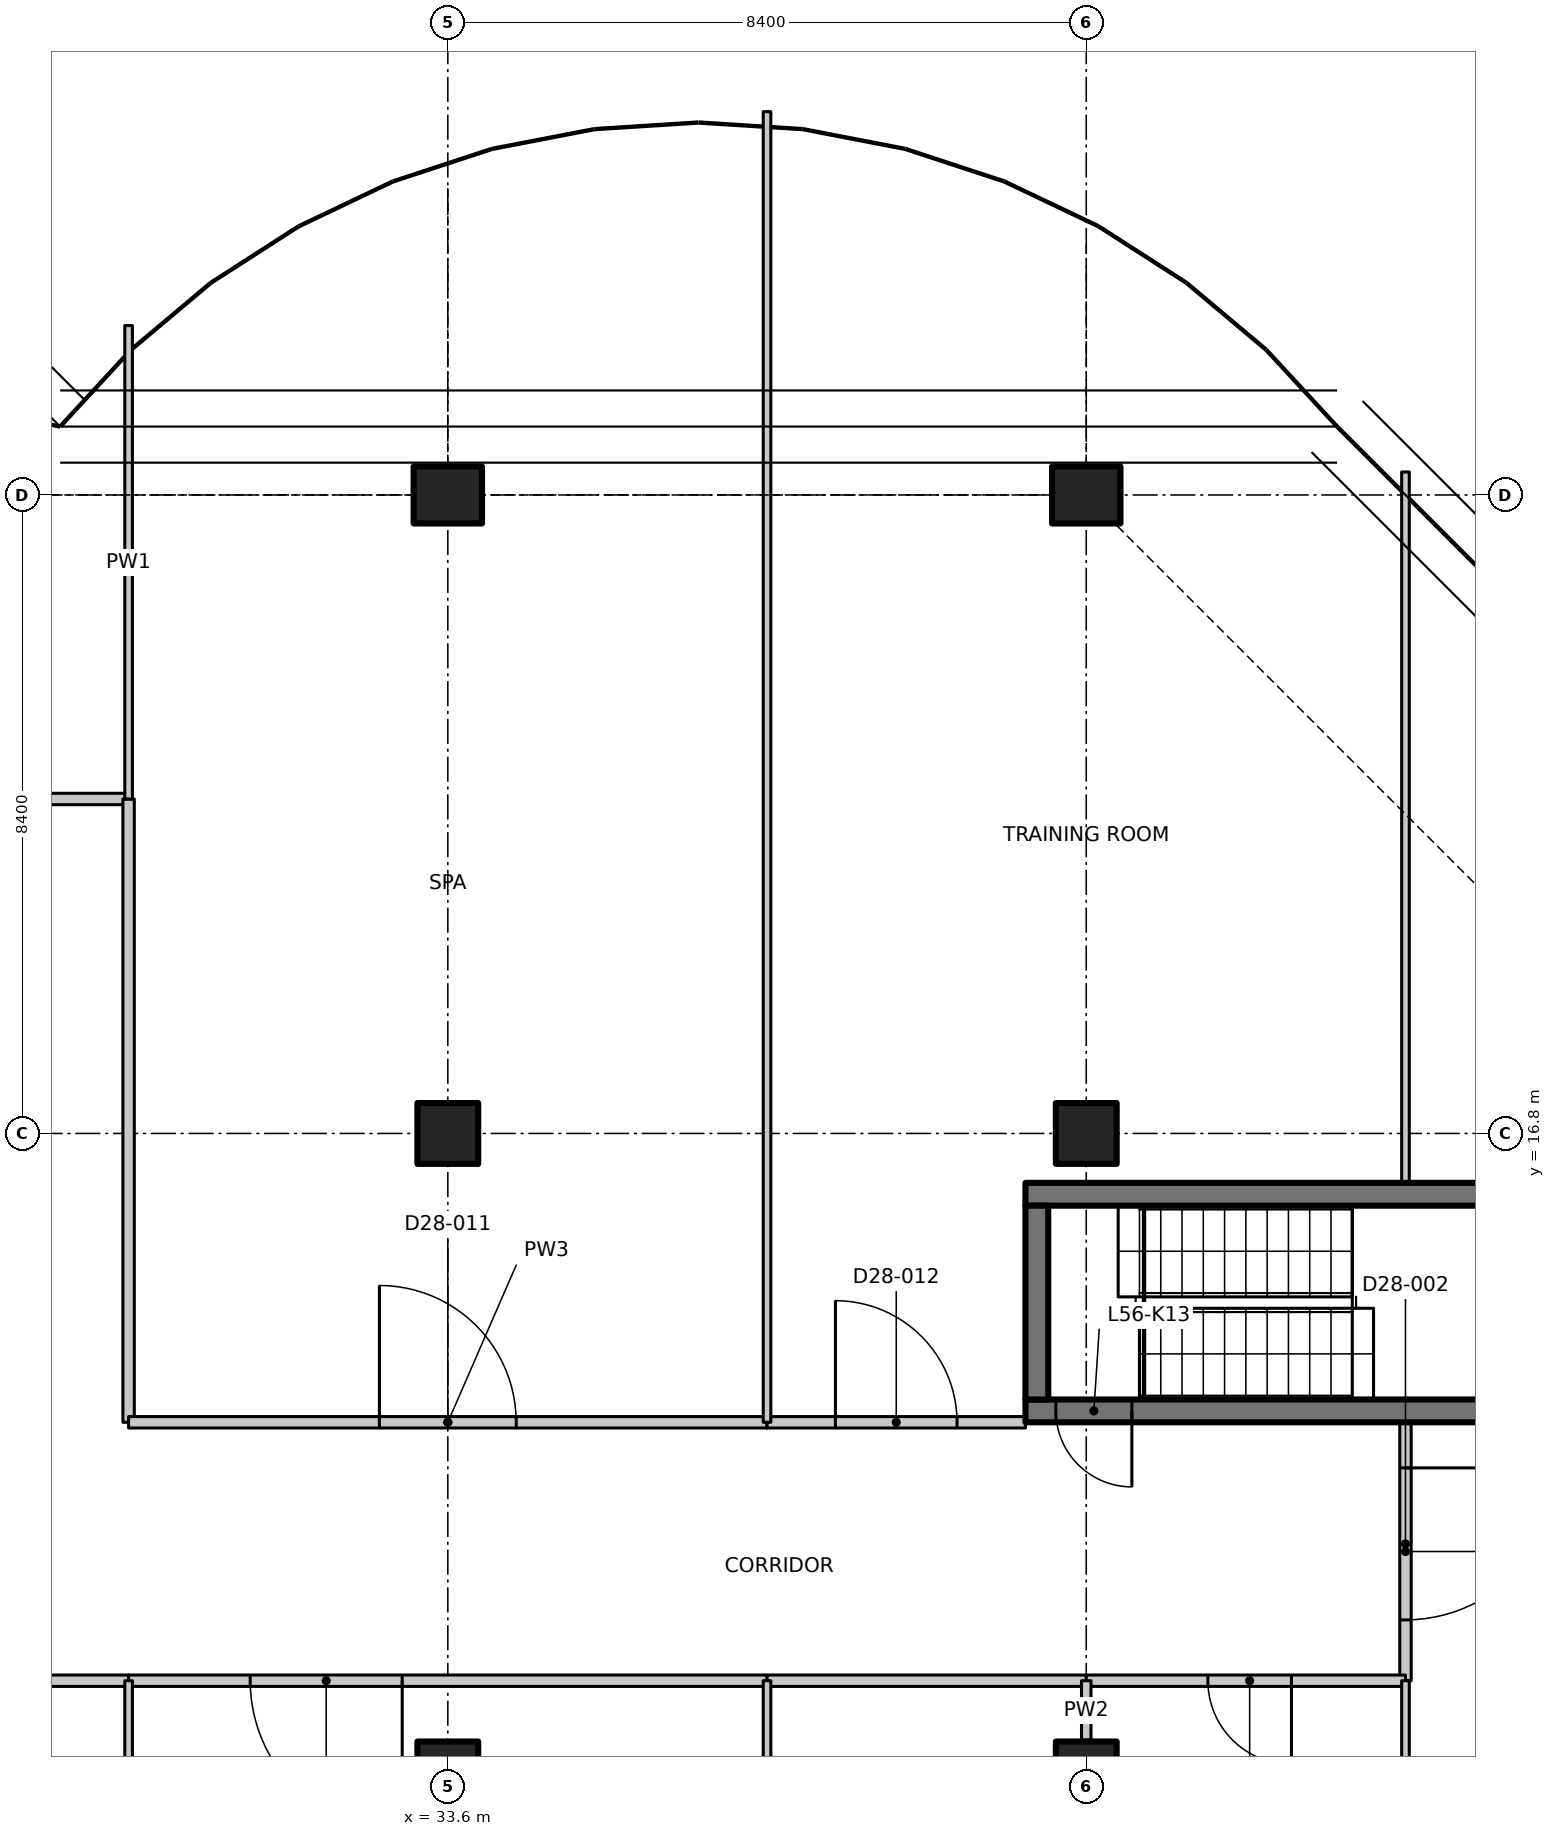
"""IFC4 building model, lengths in metres.
Left out: names, types, materials, properties, quantities, classifications, styles, units other than length and angle.
Written with IfcOpenShell. Run it as: python <this file> out.ifc"""

import sys

from ifc_helpers import new_model, si_unit, direction, frame, frame_2d, origin, origin_2d, place, context, subcontext, project, spatial, polyline, rectangle, outline, extrude, element, fill, save


model = new_model("IFC4")
c1 = context("Model", 3, precision=1e-05, world=origin(), true_north=direction((0.0, 1.0)))
c2 = subcontext(c1, "Body", "Model", "MODEL_VIEW")
j1 = project(units=[si_unit("LENGTHUNIT", "METRE"), si_unit("PLANEANGLEUNIT", "RADIAN")], contexts=[c1])
p1 = place(None, origin())
s1 = spatial("IfcSite", under=j1, at=p1, CompositionType="ELEMENT")
p2 = place(p1, origin())
s2 = spatial("IfcBuilding", under=s1, at=p2, CompositionType="ELEMENT")
p3 = place(p2, frame((0.0, 0.0, 222.9)))
s3 = spatial("IfcBuildingStorey", under=s2, at=p3, CompositionType="ELEMENT", Elevation=222.9)
for number, where, z_axis, x_axis in (
    (1, (33.6, 8.4, 0.0), (0.0, 0.0, 1.0), (1.0, 0.0, 0.0)),
    (2, (33.6, 16.8, 0.0), (0.0, 0.0, 1.0), (1.0, 0.0, 0.0)),
):
    element("IfcColumn", number, at=place(p3, frame(where, z_axis=z_axis, x_axis=x_axis)), inside=s3, PredefinedType="COLUMN", context=c2, shape_type="SweptSolid", body=[
        extrude(rectangle(XDim=0.8, YDim=0.8, at=origin_2d()), origin(), (0.0, 0.0, 1.0), 3.35),
    ])
p4 = place(p3, frame((33.6, 25.2, 0.0), z_axis=(0.0, 0.0, 1.0), x_axis=(0.0, 1.0, 0.0)))
e3 = element("IfcColumn", 3, at=p4, inside=s3, PredefinedType="COLUMN", context=c2, shape_type="SweptSolid", body=[
    extrude(rectangle(XDim=0.75, YDim=0.9, at=origin_2d()), origin(), (0.0, 0.0, 1.0), 3.35),
])
for number, where, z_axis, x_axis in (
    (4, (42.0, 8.4, 0.0), (0.0, 0.0, 1.0), (1.0, 0.0, 0.0)),
    (5, (42.0, 16.8, 0.0), (0.0, 0.0, 1.0), (1.0, 0.0, 0.0)),
):
    element("IfcColumn", number, at=place(p3, frame(where, z_axis=z_axis, x_axis=x_axis)), inside=s3, PredefinedType="COLUMN", context=c2, shape_type="SweptSolid", body=[
        extrude(rectangle(XDim=0.8, YDim=0.8, at=origin_2d()), origin(), (0.0, 0.0, 1.0), 3.35),
    ])
p5 = place(p3, frame((42.0, 25.2, 0.0), z_axis=(0.0, 0.0, 1.0), x_axis=(0.0, 1.0, 0.0)))
e6 = element("IfcColumn", 6, at=p5, inside=s3, PredefinedType="COLUMN", context=c2, shape_type="SweptSolid", body=[
    extrude(rectangle(XDim=0.75, YDim=0.9, at=origin_2d()), origin(), (0.0, 0.0, 1.0), 3.35),
])
p6 = place(p3, frame((49.4, 13.15, 0.0), z_axis=(0.0, 0.0, 1.0), x_axis=(-1.0, 0.0, 0.0)))
e7 = element("IfcWall", 7, at=p6, inside=s3, PredefinedType="SHEAR", context=c2, shape_type="SweptSolid", body=[
    extrude(rectangle(XDim=8.2, YDim=0.3, at=frame_2d((4.1, 0.0))), origin(), (0.0, 0.0, 1.0), 3.35),
])
p7 = place(p6, frame((6.8, 0.0, 0.0)))
e8 = element("IfcOpeningElement", 8, at=p7, cuts=e7, PredefinedType="OPENING", context=c2, shape_type="SweptSolid", body=[
    extrude(rectangle(XDim=1.0, YDim=2.1, at=frame_2d((0.5, 1.05))), frame((0.0, 0.16, 0.0), z_axis=(0.0, -1.0, 0.0), x_axis=(1.0, 0.0, 0.0)), (0.0, 0.0, 1.0), 0.32),
])
p8 = place(p3, frame((41.2, 16.0, 0.0), z_axis=(0.0, 0.0, 1.0), x_axis=(1.0, 0.0, 0.0)))
e9 = element("IfcWall", 9, at=p8, inside=s3, PredefinedType="SHEAR", context=c2, shape_type="SweptSolid", body=[
    extrude(rectangle(XDim=8.2, YDim=0.3, at=frame_2d((4.1, 0.0))), origin(), (0.0, 0.0, 1.0), 3.35),
])
p9 = place(p3, frame((41.35, 13.3, 0.0), z_axis=(0.0, 0.0, 1.0), x_axis=(0.0, 1.0, 0.0)))
e10 = element("IfcWall", 10, at=p9, inside=s3, PredefinedType="SHEAR", context=c2, shape_type="SweptSolid", body=[
    extrude(rectangle(XDim=2.55, YDim=0.3, at=frame_2d((1.275, 0.0))), origin(), (0.0, 0.0, 1.0), 3.35),
])
p10 = place(p3, frame((25.2, 21.2, 0.0), z_axis=(0.0, 0.0, 1.0), x_axis=(1.0, 0.0, 0.0)))
e11 = element("IfcWall", 11, at=p10, inside=s3, PredefinedType="PARTITIONING", context=c2, shape_type="SweptSolid", body=[
    extrude(rectangle(XDim=4.2, YDim=0.15, at=frame_2d((2.1, 0.0))), origin(), (0.0, 0.0, 1.0), 3.33),
])
p11 = place(p10, frame((1.5, 0.0, 0.0)))
e12 = element("IfcOpeningElement", 12, at=p11, cuts=e11, PredefinedType="OPENING", context=c2, shape_type="SweptSolid", body=[
    extrude(rectangle(XDim=1.0, YDim=2.1, at=frame_2d((0.5, 1.05))), frame((0.0, 0.085, 0.0), z_axis=(0.0, -1.0, 0.0), x_axis=(1.0, 0.0, 0.0)), (0.0, 0.0, 1.0), 0.17),
])
p12 = place(p3, frame((29.4, 9.6, 0.0), z_axis=(0.0, 0.0, 1.0), x_axis=(-1.0, 0.0, 0.0)))
e13 = element("IfcWall", 13, at=p12, inside=s3, PredefinedType="PARTITIONING", context=c2, shape_type="SweptSolid", body=[
    extrude(rectangle(XDim=4.2, YDim=0.15, at=frame_2d((2.1, 0.0))), origin(), (0.0, 0.0, 1.0), 3.33),
])
p13 = place(p3, frame((29.4, 21.2, 0.0), z_axis=(0.0, 0.0, 1.0), x_axis=(0.0, -1.0, 0.0)))
e14 = element("IfcWall", 14, at=p13, inside=s3, PredefinedType="PARTITIONING", context=c2, shape_type="SweptSolid", body=[
    extrude(rectangle(XDim=8.2, YDim=0.15, at=frame_2d((4.1, 0.0))), origin(), (0.0, 0.0, 1.0), 3.33),
])
p14 = place(p3, frame((29.4, 27.429, 0.0), z_axis=(0.0, 0.0, 1.0), x_axis=(0.0, -1.0, 0.0)))
e15 = element("IfcWall", 15, at=p14, inside=s3, PredefinedType="PARTITIONING", context=c2, shape_type="SweptSolid", body=[
    extrude(outline(polyline([(0.0, 0.0), (6.229, 0.0), (6.229, 3.33), (2.679, 3.33), (2.677, 2.98), (1.781, 2.98), (1.779, 3.33), (0.154, 3.33), (0.0, 3.33), (0.0, 0.0)])), frame((0.0, 0.05, 0.0), z_axis=(0.0, -1.0, 0.0), x_axis=(1.0, 0.0, 0.0)), (0.0, 0.0, 1.0), 0.1),
])
p15 = place(p3, frame((46.2, 13.0, 0.0), z_axis=(0.0, 0.0, 1.0), x_axis=(0.0, -1.0, 0.0)))
e16 = element("IfcWall", 16, at=p15, inside=s3, PredefinedType="PARTITIONING", context=c2, shape_type="SweptSolid", body=[
    extrude(rectangle(XDim=3.4, YDim=0.15, at=frame_2d((1.7, 0.0))), origin(), (0.0, 0.0, 1.0), 3.33),
])
p16 = place(p15, frame((0.6, 0.0, 0.0)))
e17 = element("IfcOpeningElement", 17, at=p16, cuts=e16, PredefinedType="OPENING", context=c2, shape_type="SweptSolid", body=[
    extrude(rectangle(XDim=2.0, YDim=2.4, at=frame_2d((1.0, 1.2))), frame((0.0, 0.085, 0.0), z_axis=(0.0, -1.0, 0.0), x_axis=(1.0, 0.0, 0.0)), (0.0, 0.0, 1.0), 0.17),
])
p17 = place(p3, frame((37.8, 9.6, 0.0), z_axis=(0.0, 0.0, 1.0), x_axis=(-1.0, 0.0, 0.0)))
e18 = element("IfcWall", 18, at=p17, inside=s3, PredefinedType="PARTITIONING", context=c2, shape_type="SweptSolid", body=[
    extrude(rectangle(XDim=8.4, YDim=0.15, at=frame_2d((4.2, 0.0))), origin(), (0.0, 0.0, 1.0), 3.33),
])
p18 = place(p17, frame((4.8, 0.0, 0.0)))
e19 = element("IfcOpeningElement", 19, at=p18, cuts=e18, PredefinedType="OPENING", context=c2, shape_type="SweptSolid", body=[
    extrude(rectangle(XDim=2.0, YDim=2.4, at=frame_2d((1.0, 1.2))), frame((0.0, 0.085, 0.0), z_axis=(0.0, -1.0, 0.0), x_axis=(1.0, 0.0, 0.0)), (0.0, 0.0, 1.0), 0.17),
])
p19 = place(p3, frame((42.0, 9.6, 0.0), z_axis=(0.0, 0.0, 1.0), x_axis=(-1.0, 0.0, 0.0)))
e20 = element("IfcWall", 20, at=p19, inside=s3, PredefinedType="PARTITIONING", context=c2, shape_type="SweptSolid", body=[
    extrude(rectangle(XDim=4.2, YDim=0.15, at=frame_2d((2.1, 0.0))), origin(), (0.0, 0.0, 1.0), 3.33),
])
p20 = place(p3, frame((46.2, 9.6, 0.0), z_axis=(0.0, 0.0, 1.0), x_axis=(-1.0, 0.0, 0.0)))
e21 = element("IfcWall", 21, at=p20, inside=s3, PredefinedType="PARTITIONING", context=c2, shape_type="SweptSolid", body=[
    extrude(rectangle(XDim=4.2, YDim=0.15, at=frame_2d((2.1, 0.0))), origin(), (0.0, 0.0, 1.0), 3.33),
])
p21 = place(p20, frame((1.5, 0.0, 0.0)))
e22 = element("IfcOpeningElement", 22, at=p21, cuts=e21, PredefinedType="OPENING", context=c2, shape_type="SweptSolid", body=[
    extrude(rectangle(XDim=1.1, YDim=2.1, at=frame_2d((0.55, 1.05))), frame((0.0, 0.085, 0.0), z_axis=(0.0, -1.0, 0.0), x_axis=(1.0, 0.0, 0.0)), (0.0, 0.0, 1.0), 0.17),
])
p22 = place(p3, frame((29.4, 13.0, 0.0), z_axis=(0.0, 0.0, 1.0), x_axis=(1.0, 0.0, 0.0)))
e23 = element("IfcWall", 23, at=p22, inside=s3, PredefinedType="PARTITIONING", context=c2, shape_type="SweptSolid", body=[
    extrude(rectangle(XDim=8.4, YDim=0.15, at=frame_2d((4.2, 0.0))), origin(), (0.0, 0.0, 1.0), 3.33),
])
p23 = place(p22, frame((3.3, 0.0, 0.0)))
e24 = element("IfcOpeningElement", 24, at=p23, cuts=e23, PredefinedType="OPENING", context=c2, shape_type="SweptSolid", body=[
    extrude(rectangle(XDim=1.8, YDim=2.1, at=frame_2d((0.9, 1.05))), frame((0.0, 0.085, 0.0), z_axis=(0.0, -1.0, 0.0), x_axis=(1.0, 0.0, 0.0)), (0.0, 0.0, 1.0), 0.17),
])
p24 = place(p3, frame((37.8, 13.0, 0.0), z_axis=(0.0, 0.0, 1.0), x_axis=(1.0, 0.0, 0.0)))
e25 = element("IfcWall", 25, at=p24, inside=s3, PredefinedType="PARTITIONING", context=c2, shape_type="SweptSolid", body=[
    extrude(rectangle(XDim=3.4, YDim=0.15, at=frame_2d((1.7, 0.0))), origin(), (0.0, 0.0, 1.0), 3.33),
])
p25 = place(p24, frame((0.9, 0.0, 0.0)))
e26 = element("IfcOpeningElement", 26, at=p25, cuts=e25, PredefinedType="OPENING", context=c2, shape_type="SweptSolid", body=[
    extrude(rectangle(XDim=1.6, YDim=2.1, at=frame_2d((0.8, 1.05))), frame((0.0, 0.085, 0.0), z_axis=(0.0, -1.0, 0.0), x_axis=(1.0, 0.0, 0.0)), (0.0, 0.0, 1.0), 0.17),
])
p26 = place(p3, frame((46.2, -0.2, 0.0), z_axis=(0.0, 0.0, 1.0), x_axis=(0.0, 1.0, 0.0)))
e27 = element("IfcWall", 27, at=p26, inside=s3, PredefinedType="PARTITIONING", context=c2, shape_type="SweptSolid", body=[
    extrude(outline(polyline([(0.0, 0.0), (9.8, 0.0), (9.8, 3.33), (5.066, 3.33), (5.064, 2.98), (3.736, 2.98), (3.734, 3.33), (0.0, 3.33), (0.0, 0.0)])), frame((0.0, 0.05, 0.0), z_axis=(0.0, -1.0, 0.0), x_axis=(1.0, 0.0, 0.0)), (0.0, 0.0, 1.0), 0.1),
])
p27 = place(p3, frame((46.2, 16.15, 0.0), z_axis=(0.0, 0.0, 1.0), x_axis=(0.0, 1.0, 0.0)))
e28 = element("IfcWall", 28, at=p27, inside=s3, PredefinedType="PARTITIONING", context=c2, shape_type="SweptSolid", body=[
    extrude(outline(polyline([(0.0, 0.0), (9.353, 0.0), (9.353, 3.33), (9.25, 3.33), (5.516, 3.33), (5.514, 2.98), (4.186, 2.98), (4.184, 3.33), (0.0, 3.33), (0.0, 0.0)])), frame((0.0, 0.05, 0.0), z_axis=(0.0, -1.0, 0.0), x_axis=(1.0, 0.0, 0.0)), (0.0, 0.0, 1.0), 0.1),
])
p28 = place(p3, frame((37.8, 9.6, 0.0), z_axis=(0.0, 0.0, 1.0), x_axis=(0.0, -1.0, 0.0)))
e29 = element("IfcWall", 29, at=p28, inside=s3, PredefinedType="PARTITIONING", context=c2, shape_type="SweptSolid", body=[
    extrude(rectangle(XDim=3.6, YDim=0.1, at=frame_2d((1.8, 0.0))), origin(), (0.0, 0.0, 1.0), 3.33),
])
p29 = place(p3, frame((29.4, 5.4, 0.0), z_axis=(0.0, 0.0, 1.0), x_axis=(0.0, 1.0, 0.0)))
e30 = element("IfcWall", 30, at=p29, inside=s3, PredefinedType="PARTITIONING", context=c2, shape_type="SweptSolid", body=[
    extrude(rectangle(XDim=4.2, YDim=0.1, at=frame_2d((2.1, 0.0))), origin(), (0.0, 0.0, 1.0), 3.33),
])
p30 = place(p29, frame((1.8, 0.0, 0.0)))
e31 = element("IfcOpeningElement", 31, at=p30, cuts=e30, PredefinedType="OPENING", context=c2, shape_type="SweptSolid", body=[
    extrude(rectangle(XDim=0.9, YDim=2.1, at=frame_2d((0.45, 1.05))), frame((0.0, 0.06, 0.0), z_axis=(0.0, -1.0, 0.0), x_axis=(1.0, 0.0, 0.0)), (0.0, 0.0, 1.0), 0.12),
])
p31 = place(p3, frame((42.0, 9.6, 0.0), z_axis=(0.0, 0.0, 1.0), x_axis=(0.0, -1.0, 0.0)))
e32 = element("IfcWall", 32, at=p31, inside=s3, PredefinedType="PARTITIONING", context=c2, shape_type="SweptSolid", body=[
    extrude(rectangle(XDim=0.78, YDim=0.125, at=frame_2d((0.39, 0.0))), origin(), (0.0, 0.0, 1.0), 3.33),
])
p32 = place(p3, frame((37.8, 30.243, 0.0), z_axis=(0.0, 0.0, 1.0), x_axis=(0.0, -1.0, 0.0)))
e33 = element("IfcWall", 33, at=p32, inside=s3, PredefinedType="PARTITIONING", context=c2, shape_type="SweptSolid", body=[
    extrude(outline(polyline([(0.0, 0.0), (17.243, 0.0), (17.243, 3.33), (5.493, 3.33), (5.491, 2.98), (4.595, 2.98), (4.593, 3.33), (0.0, 3.33), (0.0, 0.0)])), frame((0.0, 0.05, 0.0), z_axis=(0.0, -1.0, 0.0), x_axis=(1.0, 0.0, 0.0)), (0.0, 0.0, 1.0), 0.1),
])
p33 = place(p7, origin())
e34 = element("IfcDoor", 34, at=p33, inside=s3, OperationType="SINGLE_SWING_RIGHT", PredefinedType="DOOR", context=c2, shape_type="SweptSolid", body=[
    extrude(rectangle(XDim=1.0, YDim=2.1, at=frame_2d((0.5, 1.05))), frame((0.0, 0.025, 0.0), z_axis=(0.0, -1.0, 0.0), x_axis=(1.0, 0.0, 0.0)), (0.0, 0.0, 1.0), 0.05),
])
fill(e8, e34)
p34 = place(p16, origin())
e35 = element("IfcDoor", 35, at=p34, inside=s3, OperationType="DOUBLE_DOOR_SINGLE_SWING", PredefinedType="DOOR", context=c2, shape_type="SweptSolid", body=[
    extrude(rectangle(XDim=2.0, YDim=2.4, at=frame_2d((1.0, 1.2))), frame((0.0, 0.025, 0.0), z_axis=(0.0, -1.0, 0.0), x_axis=(1.0, 0.0, 0.0)), (0.0, 0.0, 1.0), 0.05),
])
fill(e17, e35)
p35 = place(p18, origin())
e36 = element("IfcDoor", 36, at=p35, inside=s3, OperationType="DOUBLE_DOOR_SINGLE_SWING", PredefinedType="DOOR", context=c2, shape_type="SweptSolid", body=[
    extrude(rectangle(XDim=2.0, YDim=2.4, at=frame_2d((1.0, 1.2))), frame((0.0, 0.025, 0.0), z_axis=(0.0, -1.0, 0.0), x_axis=(1.0, 0.0, 0.0)), (0.0, 0.0, 1.0), 0.05),
])
fill(e19, e36)
p36 = place(p21, origin())
e37 = element("IfcDoor", 37, at=p36, inside=s3, OperationType="SINGLE_SWING_LEFT", PredefinedType="DOOR", context=c2, shape_type="SweptSolid", body=[
    extrude(rectangle(XDim=1.1, YDim=2.1, at=frame_2d((0.55, 1.05))), frame((0.0, 0.025, 0.0), z_axis=(0.0, -1.0, 0.0), x_axis=(1.0, 0.0, 0.0)), (0.0, 0.0, 1.0), 0.05),
])
fill(e22, e37)
p37 = place(p23, origin())
e38 = element("IfcDoor", 38, at=p37, inside=s3, OperationType="DOUBLE_DOOR_SINGLE_SWING", PredefinedType="DOOR", context=c2, shape_type="SweptSolid", body=[
    extrude(rectangle(XDim=1.8, YDim=2.1, at=frame_2d((0.9, 1.05))), frame((0.0, 0.025, 0.0), z_axis=(0.0, -1.0, 0.0), x_axis=(1.0, 0.0, 0.0)), (0.0, 0.0, 1.0), 0.05),
])
fill(e24, e38)
p38 = place(p25, origin())
e39 = element("IfcDoor", 39, at=p38, inside=s3, OperationType="DOUBLE_DOOR_SINGLE_SWING", PredefinedType="DOOR", context=c2, shape_type="SweptSolid", body=[
    extrude(rectangle(XDim=1.6, YDim=2.1, at=frame_2d((0.8, 1.05))), frame((0.0, 0.025, 0.0), z_axis=(0.0, -1.0, 0.0), x_axis=(1.0, 0.0, 0.0)), (0.0, 0.0, 1.0), 0.05),
])
fill(e26, e39)
save(model, sys.argv[1])
